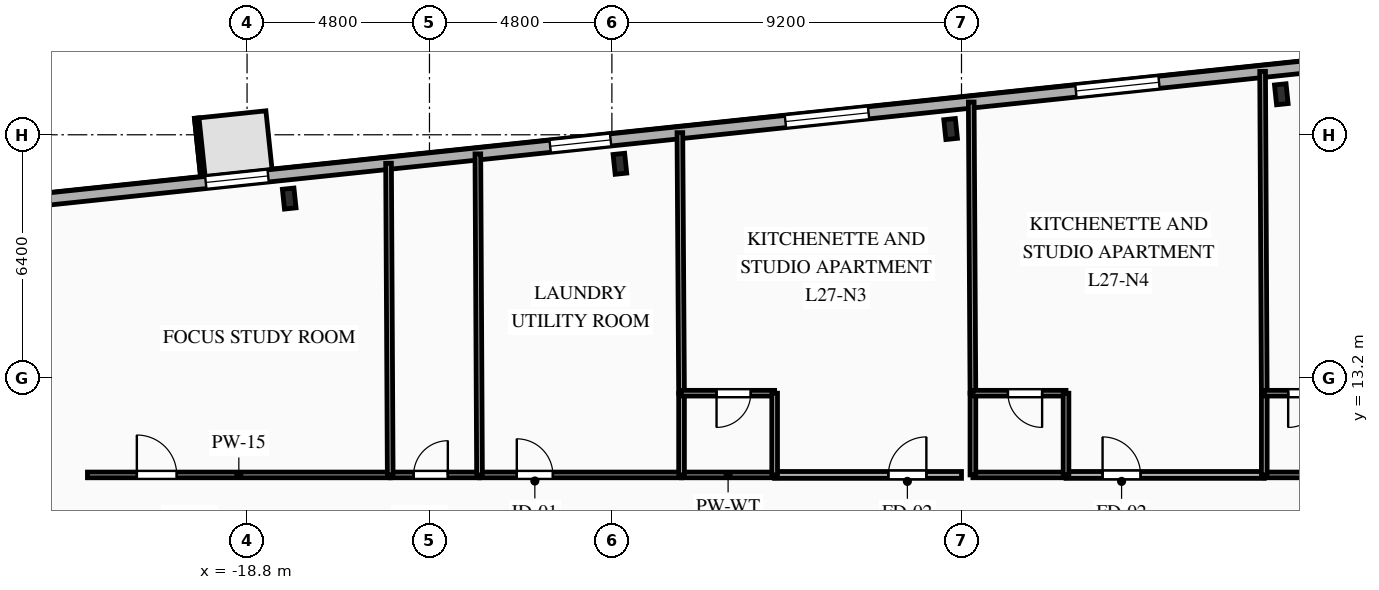
"""IFC4 building model, lengths in metres.
Left out: names, types, materials, properties, quantities, classifications, styles, units other than length and angle.
Written with IfcOpenShell. Run it as: python <this file> out.ifc"""

import sys

from ifc_helpers import new_model, si_unit, direction, frame, frame_2d, origin, origin_2d, place, context, subcontext, project, spatial, rectangle, i_section, extrude, element, fill, save


model = new_model("IFC4")
c1 = context("Model", 3, precision=1e-05, world=origin(), true_north=direction((0.0, 1.0)))
c2 = subcontext(c1, "Body", "Model", "MODEL_VIEW")
j1 = project(units=[si_unit("LENGTHUNIT", "METRE"), si_unit("PLANEANGLEUNIT", "RADIAN")], contexts=[c1])
p1 = place(None, origin())
s1 = spatial("IfcSite", under=j1, at=p1, CompositionType="ELEMENT")
p2 = place(p1, origin())
s2 = spatial("IfcBuilding", under=s1, at=p2, CompositionType="ELEMENT")
p3 = place(p2, frame((0.0, 0.0, 99.1)))
s3 = spatial("IfcBuildingStorey", under=s2, at=p3, CompositionType="ELEMENT", Elevation=99.1)
for number, where, z_axis, x_axis in (
    (1, (8.415, 20.666, 0.0), (0.0, 0.0, 1.0), (0.995, 0.105, 0.0)),
    (2, (-0.287, 19.751, 0.0), (0.0, 0.0, 1.0), (0.995, 0.105, 0.0)),
    (3, (-8.989, 18.836, 0.0), (0.0, 0.0, 1.0), (0.995, 0.105, 0.0)),
    (4, (-17.691, 17.922, 0.0), (0.0, 0.0, 1.0), (0.995, 0.105, 0.0)),
):
    element("IfcColumn", number, at=place(p3, frame(where, z_axis=z_axis, x_axis=x_axis)), inside=s3, PredefinedType="COLUMN", context=c2, shape_type="SweptSolid", body=[
        extrude(i_section(OverallWidth=0.306, OverallDepth=0.524, WebThickness=0.021, FlangeThickness=0.04, FilletRadius=0.027, at=origin_2d()), origin(), (0.0, 0.0, 1.0), 3.35),
    ])
p4 = place(p3, frame((-27.107, 17.586, 0.0), z_axis=(0.0, 0.0, 1.0), x_axis=(0.994521628355, 0.104531003701, 0.0)))
e5 = element("IfcWall", 5, at=p4, inside=s3, PredefinedType="SOLIDWALL", context=c2, shape_type="SweptSolid", body=[
    extrude(rectangle(XDim=53.8, YDim=0.32, at=frame_2d((26.9, 0.0))), origin(), (0.0, 0.0, 1.0), 3.045),
])
p5 = place(p4, frame((7.261, 0.0, 0.85)))
e6 = element("IfcOpeningElement", 6, at=p5, cuts=e5, PredefinedType="OPENING", context=c2, shape_type="SweptSolid", body=[
    extrude(rectangle(XDim=1.65, YDim=1.85, at=frame_2d((0.825, 0.925))), frame((0.0, 0.17, 0.0), z_axis=(0.0, -1.0, 0.0), x_axis=(1.0, 0.0, 0.0)), (0.0, 0.0, 1.0), 0.34),
])
p6 = place(p4, frame((16.373, 0.0, 0.85)))
e7 = element("IfcOpeningElement", 7, at=p6, cuts=e5, PredefinedType="OPENING", context=c2, shape_type="SweptSolid", body=[
    extrude(rectangle(XDim=1.6, YDim=1.85, at=frame_2d((0.8, 0.925))), frame((0.0, 0.17, 0.0), z_axis=(0.0, -1.0, 0.0), x_axis=(1.0, 0.0, 0.0)), (0.0, 0.0, 1.0), 0.34),
])
p7 = place(p4, frame((22.598, 0.0, 0.85)))
e8 = element("IfcOpeningElement", 8, at=p7, cuts=e5, PredefinedType="OPENING", context=c2, shape_type="SweptSolid", body=[
    extrude(rectangle(XDim=2.2, YDim=1.85, at=frame_2d((1.1, 0.925))), frame((0.0, 0.17, 0.0), z_axis=(0.0, -1.0, 0.0), x_axis=(1.0, 0.0, 0.0)), (0.0, 0.0, 1.0), 0.34),
])
p8 = place(p4, frame((30.283, 0.0, 0.85)))
e9 = element("IfcOpeningElement", 9, at=p8, cuts=e5, PredefinedType="OPENING", context=c2, shape_type="SweptSolid", body=[
    extrude(rectangle(XDim=2.2, YDim=1.85, at=frame_2d((1.1, 0.925))), frame((0.0, 0.17, 0.0), z_axis=(0.0, -1.0, 0.0), x_axis=(1.0, 0.0, 0.0)), (0.0, 0.0, 1.0), 0.34),
])
p9 = place(p4, frame((38.009, 0.0, 0.85)))
e10 = element("IfcOpeningElement", 10, at=p9, cuts=e5, PredefinedType="OPENING", context=c2, shape_type="SweptSolid", body=[
    extrude(rectangle(XDim=2.2, YDim=1.85, at=frame_2d((1.1, 0.925))), frame((0.0, 0.17, 0.0), z_axis=(0.0, -1.0, 0.0), x_axis=(1.0, 0.0, 0.0)), (0.0, 0.0, 1.0), 0.34),
])
p10 = place(p4, frame((44.008, 0.0, 0.85)))
e11 = element("IfcOpeningElement", 11, at=p10, cuts=e5, PredefinedType="OPENING", context=c2, shape_type="SweptSolid", body=[
    extrude(rectangle(XDim=1.65, YDim=1.85, at=frame_2d((0.825, 0.925))), frame((0.0, 0.17, 0.0), z_axis=(0.0, -1.0, 0.0), x_axis=(1.0, 0.0, 0.0)), (0.0, 0.0, 1.0), 0.34),
])
p11 = place(p4, frame((47.691, 0.0, 0.85)))
e12 = element("IfcOpeningElement", 12, at=p11, cuts=e5, PredefinedType="OPENING", context=c2, shape_type="SweptSolid", body=[
    extrude(rectangle(XDim=1.65, YDim=1.85, at=frame_2d((0.825, 0.925))), frame((0.0, 0.17, 0.0), z_axis=(0.0, -1.0, 0.0), x_axis=(1.0, 0.0, 0.0)), (0.0, 0.0, 1.0), 0.34),
])
p12 = place(p4, frame((51.054, 0.0, 0.85)))
e13 = element("IfcOpeningElement", 13, at=p12, cuts=e5, PredefinedType="OPENING", context=c2, shape_type="SweptSolid", body=[
    extrude(rectangle(XDim=1.65, YDim=1.85, at=frame_2d((0.825, 0.925))), frame((0.0, 0.17, 0.0), z_axis=(0.0, -1.0, 0.0), x_axis=(1.0, 0.0, 0.0)), (0.0, 0.0, 1.0), 0.34),
])
p13 = place(p3, frame((-23.0, 10.65, 0.0), z_axis=(0.0, 0.0, 1.0), x_axis=(1.0, 0.0, 0.0)))
e14 = element("IfcWall", 14, at=p13, inside=s3, PredefinedType="PARTITIONING", context=c2, shape_type="SweptSolid", body=[
    extrude(rectangle(XDim=7.967, YDim=0.15, at=frame_2d((3.983, 0.0))), origin(), (0.0, 0.0, 1.0), 3.045),
])
p14 = place(p13, frame((1.3, 0.0, 0.0)))
e15 = element("IfcOpeningElement", 15, at=p14, cuts=e14, PredefinedType="OPENING", context=c2, shape_type="SweptSolid", body=[
    extrude(rectangle(XDim=1.05, YDim=2.15, at=frame_2d((0.525, 1.075))), frame((0.0, 0.085, 0.0), z_axis=(0.0, -1.0, 0.0), x_axis=(1.0, 0.0, 0.0)), (0.0, 0.0, 1.0), 0.17),
])
p15 = place(p3, frame((-15.033, 10.65, 0.0), z_axis=(0.0, 0.0, 1.0), x_axis=(1.0, 0.0, 0.0)))
e16 = element("IfcWall", 16, at=p15, inside=s3, PredefinedType="PLUMBINGWALL", context=c2, shape_type="SweptSolid", body=[
    extrude(rectangle(XDim=2.35, YDim=0.15, at=frame_2d((1.175, 0.0))), origin(), (0.0, 0.0, 1.0), 3.045),
])
p16 = place(p15, frame((0.616, 0.0, 0.0)))
e17 = element("IfcOpeningElement", 17, at=p16, cuts=e16, PredefinedType="OPENING", context=c2, shape_type="SweptSolid", body=[
    extrude(rectangle(XDim=0.9, YDim=2.1, at=frame_2d((0.45, 1.05))), frame((0.0, 0.085, 0.0), z_axis=(0.0, -1.0, 0.0), x_axis=(1.0, 0.0, 0.0)), (0.0, 0.0, 1.0), 0.17),
])
p17 = place(p3, frame((-12.683, 10.65, 0.0), z_axis=(0.0, 0.0, 1.0), x_axis=(1.0, 0.0, 0.0)))
e18 = element("IfcWall", 18, at=p17, inside=s3, PredefinedType="PARTITIONING", context=c2, shape_type="SweptSolid", body=[
    extrude(rectangle(XDim=5.316, YDim=0.15, at=frame_2d((2.658, 0.0))), origin(), (0.0, 0.0, 1.0), 3.045),
])
p18 = place(p17, frame((0.981, 0.0, 0.0)))
e19 = element("IfcOpeningElement", 19, at=p18, cuts=e18, PredefinedType="OPENING", context=c2, shape_type="SweptSolid", body=[
    extrude(rectangle(XDim=0.95, YDim=2.1, at=frame_2d((0.475, 1.05))), frame((0.0, 0.085, 0.0), z_axis=(0.0, -1.0, 0.0), x_axis=(1.0, 0.0, 0.0)), (0.0, 0.0, 1.0), 0.17),
])
p19 = place(p3, frame((-4.917, 10.65, 0.0), z_axis=(0.0, 0.0, 1.0), x_axis=(1.0, 0.0, 0.0)))
e20 = element("IfcWall", 20, at=p19, inside=s3, PredefinedType="PARTITIONING", context=c2, shape_type="SweptSolid", body=[
    extrude(rectangle(XDim=4.917, YDim=0.18, at=frame_2d((2.458, 0.0))), origin(), (0.0, 0.0, 1.0), 3.045),
])
p20 = place(p19, frame((2.992, 0.0, 0.0)))
e21 = element("IfcOpeningElement", 21, at=p20, cuts=e20, PredefinedType="OPENING", context=c2, shape_type="SweptSolid", body=[
    extrude(rectangle(XDim=1.0, YDim=2.15, at=frame_2d((0.5, 1.075))), frame((0.0, 0.1, 0.0), z_axis=(0.0, -1.0, 0.0), x_axis=(1.0, 0.0, 0.0)), (0.0, 0.0, 1.0), 0.2),
])
p21 = place(p3, frame((-7.367, 10.65, 0.0), z_axis=(0.0, 0.0, 1.0), x_axis=(1.0, 0.0, 0.0)))
e22 = element("IfcWall", 22, at=p21, inside=s3, PredefinedType="PLUMBINGWALL", context=c2, shape_type="SweptSolid", body=[
    extrude(rectangle(XDim=2.45, YDim=0.15, at=frame_2d((1.225, 0.0))), origin(), (0.0, 0.0, 1.0), 3.045),
])
p22 = place(p3, frame((2.75, 10.65, 0.0), z_axis=(0.0, 0.0, 1.0), x_axis=(1.0, 0.0, 0.0)))
e23 = element("IfcWall", 23, at=p22, inside=s3, PredefinedType="PARTITIONING", context=c2, shape_type="SweptSolid", body=[
    extrude(rectangle(XDim=5.217, YDim=0.18, at=frame_2d((2.608, 0.0))), origin(), (0.0, 0.0, 1.0), 3.045),
])
p23 = place(p22, frame((0.962, 0.0, 0.0)))
e24 = element("IfcOpeningElement", 24, at=p23, cuts=e23, PredefinedType="OPENING", context=c2, shape_type="SweptSolid", body=[
    extrude(rectangle(XDim=1.0, YDim=2.15, at=frame_2d((0.5, 1.075))), frame((0.0, 0.1, 0.0), z_axis=(0.0, -1.0, 0.0), x_axis=(1.0, 0.0, 0.0)), (0.0, 0.0, 1.0), 0.2),
])
for number, where, z_axis, x_axis in (
    (25, (0.3, 10.65, 0.0), (0.0, 0.0, 1.0), (1.0, 0.0, 0.0)),
    (26, (7.967, 10.65, 0.0), (0.0, 0.0, 1.0), (1.0, 0.0, 0.0)),
):
    element("IfcWall", number, at=place(p3, frame(where, z_axis=z_axis, x_axis=x_axis)), inside=s3, PredefinedType="PLUMBINGWALL", context=c2, shape_type="SweptSolid", body=[
        extrude(rectangle(XDim=2.45, YDim=0.15, at=frame_2d((1.225, 0.0))), origin(), (0.0, 0.0, 1.0), 3.045),
    ])
p24 = place(p3, frame((-15.077, 18.85, 0.0), z_axis=(0.0, 0.0, 1.0), x_axis=(0.005358979853, -0.999985640564, 0.0)))
e27 = element("IfcWall", 27, at=p24, inside=s3, PredefinedType="PLUMBINGWALL", context=c2, shape_type="SweptSolid", body=[
    extrude(rectangle(XDim=8.2, YDim=0.15, at=frame_2d((4.1, 0.0))), origin(), (0.0, 0.0, 1.0), 3.045),
])
p25 = place(p3, frame((-12.727, 19.097, 0.0), z_axis=(0.0, 0.0, 1.0), x_axis=(0.005173341175, -0.999986618181, 0.0)))
e28 = element("IfcWall", 28, at=p25, inside=s3, PredefinedType="PLUMBINGWALL", context=c2, shape_type="SweptSolid", body=[
    extrude(rectangle(XDim=8.447, YDim=0.15, at=frame_2d((4.224, 0.0))), origin(), (0.0, 0.0, 1.0), 3.045),
])
p26 = place(p3, frame((-7.411, 19.656, 0.0), z_axis=(0.0, 0.0, 1.0), x_axis=(0.006409668201, -0.999979457866, 0.0)))
e29 = element("IfcWall", 29, at=p26, inside=s3, PredefinedType="PARTITIONING", context=c2, shape_type="SweptSolid", body=[
    extrude(rectangle(XDim=6.856, YDim=0.15, at=frame_2d((3.428, 0.0))), origin(), (0.0, 0.0, 1.0), 3.045),
])
p27 = place(p3, frame((-7.367, 12.8, 0.0), z_axis=(0.0, 0.0, 1.0), x_axis=(0.0, -1.0, 0.0)))
e30 = element("IfcWall", 30, at=p27, inside=s3, PredefinedType="PLUMBINGWALL", context=c2, shape_type="SweptSolid", body=[
    extrude(rectangle(XDim=2.15, YDim=0.15, at=frame_2d((1.075, 0.0))), origin(), (0.0, 0.0, 1.0), 3.045),
])
p28 = place(p3, frame((-4.917, 12.8, 0.0), z_axis=(0.0, 0.0, 1.0), x_axis=(-1.0, 0.0, 0.0)))
e31 = element("IfcWall", 31, at=p28, inside=s3, PredefinedType="PLUMBINGWALL", context=c2, shape_type="SweptSolid", body=[
    extrude(rectangle(XDim=2.45, YDim=0.15, at=frame_2d((1.225, 0.0))), origin(), (0.0, 0.0, 1.0), 3.045),
])
p29 = place(p28, frame((0.629, 0.0, 0.0)))
e32 = element("IfcOpeningElement", 32, at=p29, cuts=e31, PredefinedType="OPENING", context=c2, shape_type="SweptSolid", body=[
    extrude(rectangle(XDim=0.9, YDim=2.1, at=frame_2d((0.45, 1.05))), frame((0.0, 0.085, 0.0), z_axis=(0.0, -1.0, 0.0), x_axis=(1.0, 0.0, 0.0)), (0.0, 0.0, 1.0), 0.17),
])
p30 = place(p3, frame((-4.917, 10.65, 0.0), z_axis=(0.0, 0.0, 1.0), x_axis=(0.0, 1.0, 0.0)))
e33 = element("IfcWall", 33, at=p30, inside=s3, PredefinedType="PLUMBINGWALL", context=c2, shape_type="SweptSolid", body=[
    extrude(rectangle(XDim=2.15, YDim=0.15, at=frame_2d((1.075, 0.0))), origin(), (0.0, 0.0, 1.0), 3.045),
])
p31 = place(p3, frame((0.256, 20.462, 0.0), z_axis=(0.0, 0.0, 1.0), x_axis=(0.00573567775, -0.999983550865, 0.0)))
e34 = element("IfcWall", 34, at=p31, inside=s3, PredefinedType="PARTITIONING", context=c2, shape_type="SweptSolid", body=[
    extrude(rectangle(XDim=7.662, YDim=0.15, at=frame_2d((3.831, 0.0))), origin(), (0.0, 0.0, 1.0), 3.045),
])
p32 = place(p3, frame((0.3, 12.8, 0.0), z_axis=(0.0, 0.0, 1.0), x_axis=(0.0, -1.0, 0.0)))
e35 = element("IfcWall", 35, at=p32, inside=s3, PredefinedType="PLUMBINGWALL", context=c2, shape_type="SweptSolid", body=[
    extrude(rectangle(XDim=2.15, YDim=0.15, at=frame_2d((1.075, 0.0))), origin(), (0.0, 0.0, 1.0), 3.045),
])
p33 = place(p3, frame((2.75, 12.8, 0.0), z_axis=(0.0, 0.0, 1.0), x_axis=(-1.0, 0.0, 0.0)))
e36 = element("IfcWall", 36, at=p33, inside=s3, PredefinedType="PLUMBINGWALL", context=c2, shape_type="SweptSolid", body=[
    extrude(rectangle(XDim=2.45, YDim=0.15, at=frame_2d((1.225, 0.0))), origin(), (0.0, 0.0, 1.0), 3.045),
])
p34 = place(p33, frame((0.629, 0.0, 0.0)))
e37 = element("IfcOpeningElement", 37, at=p34, cuts=e36, PredefinedType="OPENING", context=c2, shape_type="SweptSolid", body=[
    extrude(rectangle(XDim=0.9, YDim=2.1, at=frame_2d((0.45, 1.05))), frame((0.0, 0.085, 0.0), z_axis=(0.0, -1.0, 0.0), x_axis=(1.0, 0.0, 0.0)), (0.0, 0.0, 1.0), 0.17),
])
p35 = place(p3, frame((2.75, 10.65, 0.0), z_axis=(0.0, 0.0, 1.0), x_axis=(0.0, 1.0, 0.0)))
e38 = element("IfcWall", 38, at=p35, inside=s3, PredefinedType="PLUMBINGWALL", context=c2, shape_type="SweptSolid", body=[
    extrude(rectangle(XDim=2.15, YDim=0.15, at=frame_2d((1.075, 0.0))), origin(), (0.0, 0.0, 1.0), 3.045),
])
p36 = place(p3, frame((7.923, 21.268, 0.0), z_axis=(0.0, 0.0, 1.0), x_axis=(0.005189792576, -0.999986532936, 0.0)))
e39 = element("IfcWall", 39, at=p36, inside=s3, PredefinedType="PARTITIONING", context=c2, shape_type="SweptSolid", body=[
    extrude(rectangle(XDim=8.468, YDim=0.15, at=frame_2d((4.234, 0.0))), origin(), (0.0, 0.0, 1.0), 3.045),
])
p37 = place(p3, frame((7.967, 12.8, 0.0), z_axis=(0.0, 0.0, 1.0), x_axis=(0.0, -1.0, 0.0)))
e40 = element("IfcWall", 40, at=p37, inside=s3, PredefinedType="PLUMBINGWALL", context=c2, shape_type="SweptSolid", body=[
    extrude(rectangle(XDim=2.15, YDim=0.15, at=frame_2d((1.075, 0.0))), origin(), (0.0, 0.0, 1.0), 3.045),
])
p38 = place(p3, frame((10.417, 12.8, 0.0), z_axis=(0.0, 0.0, 1.0), x_axis=(-1.0, 0.0, 0.0)))
e41 = element("IfcWall", 41, at=p38, inside=s3, PredefinedType="PLUMBINGWALL", context=c2, shape_type="SweptSolid", body=[
    extrude(rectangle(XDim=2.45, YDim=0.15, at=frame_2d((1.225, 0.0))), origin(), (0.0, 0.0, 1.0), 3.045),
])
p39 = place(p38, frame((0.921, 0.0, 0.0)))
e42 = element("IfcOpeningElement", 42, at=p39, cuts=e41, PredefinedType="OPENING", context=c2, shape_type="SweptSolid", body=[
    extrude(rectangle(XDim=0.9, YDim=2.1, at=frame_2d((0.45, 1.05))), frame((0.0, 0.085, 0.0), z_axis=(0.0, -1.0, 0.0), x_axis=(1.0, 0.0, 0.0)), (0.0, 0.0, 1.0), 0.17),
])
p40 = place(p5, origin())
e43 = element("IfcWindow", 43, at=p40, inside=s3, PartitioningType="SINGLE_PANEL", PredefinedType="WINDOW", context=c2, shape_type="SweptSolid", body=[
    extrude(rectangle(XDim=1.65, YDim=1.85, at=frame_2d((0.825, 0.925))), frame((0.0, 0.03, 0.0), z_axis=(0.0, -1.0, 0.0), x_axis=(1.0, 0.0, 0.0)), (0.0, 0.0, 1.0), 0.06),
])
fill(e6, e43)
p41 = place(p6, origin())
e44 = element("IfcWindow", 44, at=p41, inside=s3, PartitioningType="SINGLE_PANEL", PredefinedType="WINDOW", context=c2, shape_type="SweptSolid", body=[
    extrude(rectangle(XDim=1.6, YDim=1.85, at=frame_2d((0.8, 0.925))), frame((0.0, 0.03, 0.0), z_axis=(0.0, -1.0, 0.0), x_axis=(1.0, 0.0, 0.0)), (0.0, 0.0, 1.0), 0.06),
])
fill(e7, e44)
p42 = place(p7, origin())
e45 = element("IfcWindow", 45, at=p42, inside=s3, PartitioningType="SINGLE_PANEL", PredefinedType="WINDOW", context=c2, shape_type="SweptSolid", body=[
    extrude(rectangle(XDim=2.2, YDim=1.85, at=frame_2d((1.1, 0.925))), frame((0.0, 0.03, 0.0), z_axis=(0.0, -1.0, 0.0), x_axis=(1.0, 0.0, 0.0)), (0.0, 0.0, 1.0), 0.06),
])
fill(e8, e45)
p43 = place(p8, origin())
e46 = element("IfcWindow", 46, at=p43, inside=s3, PartitioningType="SINGLE_PANEL", PredefinedType="WINDOW", context=c2, shape_type="SweptSolid", body=[
    extrude(rectangle(XDim=2.2, YDim=1.85, at=frame_2d((1.1, 0.925))), frame((0.0, 0.03, 0.0), z_axis=(0.0, -1.0, 0.0), x_axis=(1.0, 0.0, 0.0)), (0.0, 0.0, 1.0), 0.06),
])
fill(e9, e46)
p44 = place(p14, origin())
e47 = element("IfcDoor", 47, at=p44, inside=s3, OperationType="SINGLE_SWING_LEFT", PredefinedType="DOOR", context=c2, shape_type="SweptSolid", body=[
    extrude(rectangle(XDim=1.05, YDim=2.15, at=frame_2d((0.525, 1.075))), frame((0.0, 0.025, 0.0), z_axis=(0.0, -1.0, 0.0), x_axis=(1.0, 0.0, 0.0)), (0.0, 0.0, 1.0), 0.05),
])
fill(e15, e47)
p45 = place(p16, origin())
e48 = element("IfcDoor", 48, at=p45, inside=s3, OperationType="SINGLE_SWING_RIGHT", PredefinedType="DOOR", context=c2, shape_type="SweptSolid", body=[
    extrude(rectangle(XDim=0.9, YDim=2.1, at=frame_2d((0.45, 1.05))), frame((0.0, 0.025, 0.0), z_axis=(0.0, -1.0, 0.0), x_axis=(1.0, 0.0, 0.0)), (0.0, 0.0, 1.0), 0.05),
])
fill(e17, e48)
p46 = place(p18, origin())
e49 = element("IfcDoor", 49, at=p46, inside=s3, OperationType="SINGLE_SWING_LEFT", PredefinedType="DOOR", context=c2, shape_type="SweptSolid", body=[
    extrude(rectangle(XDim=0.95, YDim=2.1, at=frame_2d((0.475, 1.05))), frame((0.0, 0.025, 0.0), z_axis=(0.0, -1.0, 0.0), x_axis=(1.0, 0.0, 0.0)), (0.0, 0.0, 1.0), 0.05),
])
fill(e19, e49)
p47 = place(p20, origin())
e50 = element("IfcDoor", 50, at=p47, inside=s3, OperationType="SINGLE_SWING_RIGHT", PredefinedType="DOOR", context=c2, shape_type="SweptSolid", body=[
    extrude(rectangle(XDim=1.0, YDim=2.15, at=frame_2d((0.5, 1.075))), frame((0.0, 0.025, 0.0), z_axis=(0.0, -1.0, 0.0), x_axis=(1.0, 0.0, 0.0)), (0.0, 0.0, 1.0), 0.05),
])
fill(e21, e50)
p48 = place(p23, origin())
e51 = element("IfcDoor", 51, at=p48, inside=s3, OperationType="SINGLE_SWING_LEFT", PredefinedType="DOOR", context=c2, shape_type="SweptSolid", body=[
    extrude(rectangle(XDim=1.0, YDim=2.15, at=frame_2d((0.5, 1.075))), frame((0.0, 0.025, 0.0), z_axis=(0.0, -1.0, 0.0), x_axis=(1.0, 0.0, 0.0)), (0.0, 0.0, 1.0), 0.05),
])
fill(e24, e51)
p49 = place(p29, origin())
e52 = element("IfcDoor", 52, at=p49, inside=s3, OperationType="SINGLE_SWING_RIGHT", PredefinedType="DOOR", context=c2, shape_type="SweptSolid", body=[
    extrude(rectangle(XDim=0.9, YDim=2.1, at=frame_2d((0.45, 1.05))), frame((0.0, 0.025, 0.0), z_axis=(0.0, -1.0, 0.0), x_axis=(1.0, 0.0, 0.0)), (0.0, 0.0, 1.0), 0.05),
])
fill(e32, e52)
p50 = place(p34, origin())
e53 = element("IfcDoor", 53, at=p50, inside=s3, OperationType="SINGLE_SWING_LEFT", PredefinedType="DOOR", context=c2, shape_type="SweptSolid", body=[
    extrude(rectangle(XDim=0.9, YDim=2.1, at=frame_2d((0.45, 1.05))), frame((0.0, 0.025, 0.0), z_axis=(0.0, -1.0, 0.0), x_axis=(1.0, 0.0, 0.0)), (0.0, 0.0, 1.0), 0.05),
])
fill(e37, e53)
p51 = place(p39, origin())
e54 = element("IfcDoor", 54, at=p51, inside=s3, OperationType="SINGLE_SWING_RIGHT", PredefinedType="DOOR", context=c2, shape_type="SweptSolid", body=[
    extrude(rectangle(XDim=0.9, YDim=2.1, at=frame_2d((0.45, 1.05))), frame((0.0, 0.025, 0.0), z_axis=(0.0, -1.0, 0.0), x_axis=(1.0, 0.0, 0.0)), (0.0, 0.0, 1.0), 0.05),
])
fill(e42, e54)
save(model, sys.argv[1])
